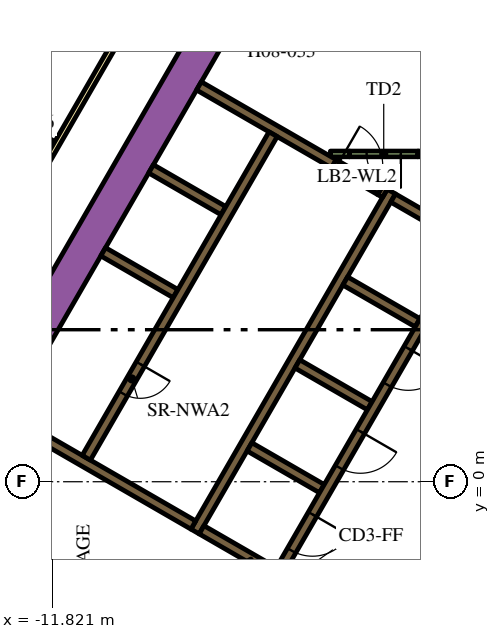
"""IFC4 building model, lengths in metres.
Left out: names, types, materials, properties, quantities, classifications, styles, units other than length and angle.
Written with IfcOpenShell. Run it as: python <this file> out.ifc"""

import sys

from ifc_helpers import new_model, si_unit, direction, frame, frame_2d, origin, place, context, subcontext, project, spatial, polyline, rectangle, outline, extrude, element, fill, save


model = new_model("IFC4")
c1 = context("Model", 3, precision=1e-05, world=origin(), true_north=direction((0.0, 1.0)))
c2 = subcontext(c1, "Body", "Model", "MODEL_VIEW")
j1 = project(units=[si_unit("LENGTHUNIT", "METRE"), si_unit("PLANEANGLEUNIT", "RADIAN")], contexts=[c1])
p1 = place(None, origin())
s1 = spatial("IfcSite", under=j1, at=p1, CompositionType="ELEMENT")
p2 = place(p1, origin())
s2 = spatial("IfcBuilding", under=s1, at=p2, CompositionType="ELEMENT")
p3 = place(p2, frame((0.0, 0.0, 111.0)))
s3 = spatial("IfcBuildingStorey", under=s2, at=p3, CompositionType="ELEMENT", Elevation=111.0)
p4 = place(p3, frame((-15.36, -1.503, 0.0), z_axis=(0.0, 0.0, 1.0), x_axis=(0.50000389221, 0.866023156604, 0.0)))
e1 = element("IfcWall", 1, at=p4, inside=s3, PredefinedType="SOLIDWALL", context=c2, shape_type="SweptSolid", body=[
    extrude(rectangle(XDim=21.0, YDim=0.9, at=frame_2d((10.5, 0.0))), origin(), (0.0, 0.0, 1.0), 3.9),
])
p5 = place(p3, frame((-8.06, -1.311, 0.0), z_axis=(0.0, 0.0, 1.0), x_axis=(0.50000273126, 0.866023826885, 0.0)))
e2 = element("IfcWall", 2, at=p5, inside=s3, PredefinedType="SOLIDWALL", context=c2, shape_type="SweptSolid", body=[
    extrude(rectangle(XDim=10.33, YDim=0.25, at=frame_2d((5.165, 0.0))), origin(), (0.0, 0.0, 1.0), 3.9),
])
p6 = place(p3, frame((-1.76, 6.836, 0.0), z_axis=(0.0, 0.0, 1.0), x_axis=(-0.865952863304, 0.500125622755, 0.0)))
e3 = element("IfcWall", 3, at=p6, inside=s3, PredefinedType="SOLIDWALL", context=c2, shape_type="SweptSolid", body=[
    extrude(rectangle(XDim=1.258, YDim=0.25, at=frame_2d((0.629, 0.0))), origin(), (0.0, 0.0, 1.0), 3.9),
])
for number, where, z_axis, x_axis in (
    (4, (-2.204, 4.182, 0.0), (0.0, 0.0, 1.0), (-0.866, 0.5, 0.0)),
    (5, (-5.369, 3.1, 0.0), (0.0, 0.0, 1.0), (0.866, -0.5, 0.0)),
    (6, (-4.724, -0.182, 0.0), (0.0, 0.0, 1.0), (-0.866, 0.5, 0.0)),
):
    element("IfcWall", number, at=place(p3, frame(where, z_axis=z_axis, x_axis=x_axis)), inside=s3, PredefinedType="SOLIDWALL", context=c2, shape_type="SweptSolid", body=[
        extrude(rectangle(XDim=2.2, YDim=0.25, at=frame_2d((1.1, 0.0))), origin(), (0.0, 0.0, 1.0), 3.9),
    ])
p7 = place(p3, origin())
e7 = element("IfcWall", 7, at=p7, inside=s3, PredefinedType="SOLIDWALL", context=c2, shape_type="SweptSolid", body=[
    extrude(outline(polyline([(-5.922, -2.257), (-5.922, -2.257), (-5.705, -2.382), (-5.83, -2.598), (-6.483, -2.221), (-6.591, -2.033), (-6.591, -2.033), (-6.7, -2.096), (-7.952, -1.373), (-7.827, -1.156), (-5.922, -2.257)])), origin(), (0.0, 0.0, 1.0), 3.9),
])
p8 = place(p3, frame((-8.106, -1.14, 0.0), z_axis=(0.0, 0.0, 1.0), x_axis=(-0.866000643155, 0.500042884217, 0.0)))
e8 = element("IfcWall", 8, at=p8, inside=s3, PredefinedType="SOLIDWALL", context=c2, shape_type="SweptSolid", body=[
    extrude(rectangle(XDim=5.65, YDim=0.25, at=frame_2d((2.825, 0.0))), origin(), (0.0, 0.0, 1.0), 3.9),
])
e9 = element("IfcWall", 9, at=p7, inside=s3, PredefinedType="SOLIDWALL", context=c2, shape_type="SweptSolid", body=[
    extrude(outline(polyline([(-3.128, 7.481), (-3.259, 7.557), (-3.134, 7.773), (-3.003, 7.698), (-3.128, 7.481)])), origin(), (0.0, 0.0, 1.0), 3.9),
])
for number, where, z_axis, x_axis in (
    (10, (-8.574, 4.95, 0.0), (0.0, 0.0, 1.0), (-0.866, 0.5, 0.0)),
    (11, (-7.314, 7.132, 0.0), (0.0, 0.0, 1.0), (-0.866, 0.5, 0.0)),
):
    element("IfcWall", number, at=place(p3, frame(where, z_axis=z_axis, x_axis=x_axis)), inside=s3, PredefinedType="SOLIDWALL", context=c2, shape_type="SweptSolid", body=[
        extrude(rectangle(XDim=2.2, YDim=0.25, at=frame_2d((1.1, 0.0))), origin(), (0.0, 0.0, 1.0), 3.9),
    ])
p9 = place(p3, frame((-7.959, 10.415, 0.0), z_axis=(0.0, 0.0, 1.0), x_axis=(0.866020958405, -0.500007699544, 0.0)))
e12 = element("IfcWall", 12, at=p9, inside=s3, PredefinedType="SOLIDWALL", context=c2, shape_type="SweptSolid", body=[
    extrude(rectangle(XDim=4.1, YDim=0.25, at=frame_2d((2.05, 0.0))), origin(), (0.0, 0.0, 1.0), 3.9),
])
p10 = place(p3, frame((-3.997, 8.625, 0.0), z_axis=(0.0, 0.0, 1.0), x_axis=(-1.0, 0.0, 0.0)))
e13 = element("IfcWall", 13, at=p10, inside=s3, PredefinedType="PARTITIONING", context=c2, shape_type="SweptSolid", body=[
    extrude(rectangle(XDim=0.502, YDim=0.15, at=frame_2d((0.251, 0.0))), origin(), (0.0, 0.0, 1.0), 2.75),
])
p11 = place(p3, frame((-2.196, 8.625, 0.0), z_axis=(0.0, 0.0, 1.0), x_axis=(1.0, 0.0, 0.0)))
e14 = element("IfcWall", 14, at=p11, inside=s3, PredefinedType="PARTITIONING", context=c2, shape_type="SweptSolid", body=[
    extrude(rectangle(XDim=1.146, YDim=0.15, at=frame_2d((0.573, 0.0))), origin(), (0.0, 0.0, 1.0), 2.75),
])
e15 = element("IfcWall", 15, at=p7, inside=s3, PredefinedType="PARTITIONING", context=c2, shape_type="SweptSolid", body=[
    extrude(outline(polyline([(-0.59, -0.872), (-0.265, -1.059), (-1.822, -3.756), (-2.147, -3.568), (-0.59, -0.872)])), origin(), (0.0, 0.0, 1.0), 2.75),
])
p12 = place(p3, frame((-6.008, 9.144, 0.0), z_axis=(0.0, 0.0, 1.0), x_axis=(-0.500006956611, -0.866021387346, 0.0)))
e16 = element("IfcWall", 16, at=p12, inside=s3, PredefinedType="SOLIDWALL", context=c2, shape_type="SweptSolid", body=[
    extrude(rectangle(XDim=9.83, YDim=0.25, at=frame_2d((4.915, 0.0))), origin(), (0.0, 0.0, 1.0), 3.9),
])
p13 = place(p12, frame((6.985, 0.0, 0.0)))
e17 = element("IfcOpeningElement", 17, at=p13, cuts=e16, PredefinedType="OPENING", context=c2, shape_type="SweptSolid", body=[
    extrude(rectangle(XDim=0.9, YDim=2.1, at=frame_2d((0.45, 1.05))), frame((0.0, 0.135, 0.0), z_axis=(0.0, -1.0, 0.0), x_axis=(1.0, 0.0, 0.0)), (0.0, 0.0, 1.0), 0.27),
])
p14 = place(p3, frame((-0.898, 6.194, 0.0), z_axis=(0.0, 0.0, 1.0), x_axis=(-0.499996202215, -0.866027596426, 0.0)))
e18 = element("IfcWall", 18, at=p14, inside=s3, PredefinedType="SOLIDWALL", context=c2, shape_type="SweptSolid", body=[
    extrude(rectangle(XDim=9.83, YDim=0.25, at=frame_2d((4.915, 0.0))), origin(), (0.0, 0.0, 1.0), 3.9),
])
p15 = place(p14, frame((0.585, 0.0, 0.0)))
e19 = element("IfcOpeningElement", 19, at=p15, cuts=e18, PredefinedType="OPENING", context=c2, shape_type="SweptSolid", body=[
    extrude(rectangle(XDim=1.1, YDim=2.1, at=frame_2d((0.55, 1.05))), frame((0.0, 0.135, 0.0), z_axis=(0.0, -1.0, 0.0), x_axis=(1.0, 0.0, 0.0)), (0.0, 0.0, 1.0), 0.27),
])
p16 = place(p14, frame((3.105, 0.0, 0.0)))
e20 = element("IfcOpeningElement", 20, at=p16, cuts=e18, PredefinedType="OPENING", context=c2, shape_type="SweptSolid", body=[
    extrude(rectangle(XDim=1.1, YDim=2.1, at=frame_2d((0.55, 1.05))), frame((0.0, 0.135, 0.0), z_axis=(0.0, -1.0, 0.0), x_axis=(1.0, 0.0, 0.0)), (0.0, 0.0, 1.0), 0.27),
])
p17 = place(p14, frame((5.625, 0.0, 0.0)))
e21 = element("IfcOpeningElement", 21, at=p17, cuts=e18, PredefinedType="OPENING", context=c2, shape_type="SweptSolid", body=[
    extrude(rectangle(XDim=1.1, YDim=2.1, at=frame_2d((0.55, 1.05))), frame((0.0, 0.135, 0.0), z_axis=(0.0, -1.0, 0.0), x_axis=(1.0, 0.0, 0.0)), (0.0, 0.0, 1.0), 0.27),
])
p18 = place(p14, frame((8.145, 0.0, 0.0)))
e22 = element("IfcOpeningElement", 22, at=p18, cuts=e18, PredefinedType="OPENING", context=c2, shape_type="SweptSolid", body=[
    extrude(rectangle(XDim=1.1, YDim=2.1, at=frame_2d((0.55, 1.05))), frame((0.0, 0.135, 0.0), z_axis=(0.0, -1.0, 0.0), x_axis=(1.0, 0.0, 0.0)), (0.0, 0.0, 1.0), 0.27),
])
p19 = place(p3, frame((-2.196, 8.625, 0.0), z_axis=(0.0, 0.0, 1.0), x_axis=(-1.0, 0.0, 0.0)))
e23 = element("IfcWall", 23, at=p19, inside=s3, PredefinedType="PARTITIONING", context=c2, shape_type="SweptSolid", body=[
    extrude(rectangle(XDim=1.8, YDim=0.15, at=frame_2d((0.9, 0.0))), origin(), (0.0, 0.0, 1.0), 2.75),
])
p20 = place(p19, frame((0.45, 0.0, 0.0)))
e24 = element("IfcOpeningElement", 24, at=p20, cuts=e23, PredefinedType="OPENING", context=c2, shape_type="SweptSolid", body=[
    extrude(rectangle(XDim=0.9, YDim=2.1, at=frame_2d((0.45, 1.05))), frame((0.0, 0.085, 0.0), z_axis=(0.0, -1.0, 0.0), x_axis=(1.0, 0.0, 0.0)), (0.0, 0.0, 1.0), 0.17),
])
p21 = place(p3, frame((-4.409, 8.365, 0.0), z_axis=(0.0, 0.0, 1.0), x_axis=(0.866034573852, -0.49998411664, 0.0)))
e25 = element("IfcWall", 25, at=p21, inside=s3, PredefinedType="SOLIDWALL", context=c2, shape_type="SweptSolid", body=[
    extrude(rectangle(XDim=1.4, YDim=0.25, at=frame_2d((0.7, 0.0))), origin(), (0.0, 0.0, 1.0), 3.9),
])
p22 = place(p21, frame((0.1, 0.0, 0.0)))
e26 = element("IfcOpeningElement", 26, at=p22, cuts=e25, PredefinedType="OPENING", context=c2, shape_type="SweptSolid", body=[
    extrude(rectangle(XDim=1.2, YDim=2.1, at=frame_2d((0.6, 1.05))), frame((0.0, 0.135, 0.0), z_axis=(0.0, -1.0, 0.0), x_axis=(1.0, 0.0, 0.0)), (0.0, 0.0, 1.0), 0.27),
])
p23 = place(p3, frame((-19.081, -3.9, 0.0), z_axis=(0.0, 0.0, 1.0), x_axis=(0.499998313975, 0.866026377209, 0.0)))
e27 = element("IfcWall", 27, at=p23, inside=s3, PredefinedType="PARTITIONING", context=c2, shape_type="SweptSolid", body=[
    extrude(rectangle(XDim=25.766, YDim=0.15, at=frame_2d((12.883, 0.0))), origin(), (0.0, 0.0, 1.0), 2.75),
])
p24 = place(p23, frame((19.306, 0.0, 0.0)))
e28 = element("IfcOpeningElement", 28, at=p24, cuts=e27, PredefinedType="OPENING", context=c2, shape_type="SweptSolid", body=[
    extrude(rectangle(XDim=1.0, YDim=2.1, at=frame_2d((0.5, 1.05))), frame((0.0, 0.085, 0.0), z_axis=(0.0, -1.0, 0.0), x_axis=(1.0, 0.0, 0.0)), (0.0, 0.0, 1.0), 0.17),
])
p25 = place(p23, frame((18.0, 0.0, 0.0)))
e29 = element("IfcOpeningElement", 29, at=p25, cuts=e27, PredefinedType="OPENING", context=c2, shape_type="SweptSolid", body=[
    extrude(rectangle(XDim=1.0, YDim=2.1, at=frame_2d((0.5, 1.05))), frame((0.0, 0.085, 0.0), z_axis=(0.0, -1.0, 0.0), x_axis=(1.0, 0.0, 0.0)), (0.0, 0.0, 1.0), 0.17),
])
p26 = place(p23, frame((6.838, 0.0, 0.0)))
e30 = element("IfcOpeningElement", 30, at=p26, cuts=e27, PredefinedType="OPENING", context=c2, shape_type="SweptSolid", body=[
    extrude(rectangle(XDim=1.0, YDim=2.1, at=frame_2d((0.5, 1.05))), frame((0.0, 0.085, 0.0), z_axis=(0.0, -1.0, 0.0), x_axis=(1.0, 0.0, 0.0)), (0.0, 0.0, 1.0), 0.17),
])
p27 = place(p23, frame((4.674, 0.0, 0.0)))
e31 = element("IfcOpeningElement", 31, at=p27, cuts=e27, PredefinedType="OPENING", context=c2, shape_type="SweptSolid", body=[
    extrude(rectangle(XDim=0.9, YDim=2.1, at=frame_2d((0.45, 1.05))), frame((0.0, 0.085, 0.0), z_axis=(0.0, -1.0, 0.0), x_axis=(1.0, 0.0, 0.0)), (0.0, 0.0, 1.0), 0.17),
])
p28 = place(p23, frame((0.18, 0.0, 0.0)))
e32 = element("IfcOpeningElement", 32, at=p28, cuts=e27, PredefinedType="OPENING", context=c2, shape_type="SweptSolid", body=[
    extrude(rectangle(XDim=1.0, YDim=2.1, at=frame_2d((0.5, 1.05))), frame((0.0, 0.085, 0.0), z_axis=(0.0, -1.0, 0.0), x_axis=(1.0, 0.0, 0.0)), (0.0, 0.0, 1.0), 0.17),
])
p29 = place(p3, frame((-11.774, 8.906, 0.0), z_axis=(0.0, 0.0, 1.0), x_axis=(-0.865997922154, 0.500047596559, 0.0)))
e33 = element("IfcWall", 33, at=p29, inside=s3, PredefinedType="PARTITIONING", context=c2, shape_type="SweptSolid", body=[
    extrude(rectangle(XDim=2.6, YDim=0.1, at=frame_2d((1.3, 0.0))), origin(), (0.0, 0.0, 1.0), 2.75),
])
p30 = place(p29, frame((0.6, 0.0, 0.0)))
e34 = element("IfcOpeningElement", 34, at=p30, cuts=e33, PredefinedType="OPENING", context=c2, shape_type="SweptSolid", body=[
    extrude(rectangle(XDim=0.9, YDim=2.1, at=frame_2d((0.45, 1.05))), frame((0.0, 0.06, 0.0), z_axis=(0.0, -1.0, 0.0), x_axis=(1.0, 0.0, 0.0)), (0.0, 0.0, 1.0), 0.12),
])
p31 = place(p13, origin())
e35 = element("IfcDoor", 35, at=p31, inside=s3, OperationType="SINGLE_SWING_LEFT", PredefinedType="DOOR", context=c2, shape_type="SweptSolid", body=[
    extrude(rectangle(XDim=0.9, YDim=2.1, at=frame_2d((0.45, 1.05))), frame((0.0, 0.025, 0.0), z_axis=(0.0, -1.0, 0.0), x_axis=(1.0, 0.0, 0.0)), (0.0, 0.0, 1.0), 0.05),
])
fill(e17, e35)
p32 = place(p16, origin())
e36 = element("IfcDoor", 36, at=p32, inside=s3, OperationType="DOUBLE_DOOR_SLIDING", PredefinedType="DOOR", context=c2, shape_type="SweptSolid", body=[
    extrude(rectangle(XDim=1.1, YDim=2.1, at=frame_2d((0.55, 1.05))), frame((0.0, 0.025, 0.0), z_axis=(0.0, -1.0, 0.0), x_axis=(1.0, 0.0, 0.0)), (0.0, 0.0, 1.0), 0.05),
])
fill(e20, e36)
p33 = place(p17, origin())
e37 = element("IfcDoor", 37, at=p33, inside=s3, OperationType="DOUBLE_DOOR_SLIDING", PredefinedType="DOOR", context=c2, shape_type="SweptSolid", body=[
    extrude(rectangle(XDim=1.1, YDim=2.1, at=frame_2d((0.55, 1.05))), frame((0.0, 0.025, 0.0), z_axis=(0.0, -1.0, 0.0), x_axis=(1.0, 0.0, 0.0)), (0.0, 0.0, 1.0), 0.05),
])
fill(e21, e37)
p34 = place(p18, origin())
e38 = element("IfcDoor", 38, at=p34, inside=s3, OperationType="DOUBLE_DOOR_SLIDING", PredefinedType="DOOR", context=c2, shape_type="SweptSolid", body=[
    extrude(rectangle(XDim=1.1, YDim=2.1, at=frame_2d((0.55, 1.05))), frame((0.0, 0.025, 0.0), z_axis=(0.0, -1.0, 0.0), x_axis=(1.0, 0.0, 0.0)), (0.0, 0.0, 1.0), 0.05),
])
fill(e22, e38)
p35 = place(p20, origin())
e39 = element("IfcDoor", 39, at=p35, inside=s3, OperationType="SINGLE_SWING_LEFT", PredefinedType="DOOR", context=c2, shape_type="SweptSolid", body=[
    extrude(rectangle(XDim=0.9, YDim=2.1, at=frame_2d((0.45, 1.05))), frame((0.0, 0.025, 0.0), z_axis=(0.0, -1.0, 0.0), x_axis=(1.0, 0.0, 0.0)), (0.0, 0.0, 1.0), 0.05),
])
fill(e24, e39)
p36 = place(p22, origin())
e40 = element("IfcDoor", 40, at=p36, inside=s3, OperationType="SINGLE_SWING_LEFT", PredefinedType="DOOR", context=c2, shape_type="SweptSolid", body=[
    extrude(rectangle(XDim=1.2, YDim=2.1, at=frame_2d((0.6, 1.05))), frame((0.0, 0.025, 0.0), z_axis=(0.0, -1.0, 0.0), x_axis=(1.0, 0.0, 0.0)), (0.0, 0.0, 1.0), 0.05),
])
fill(e26, e40)
save(model, sys.argv[1])
